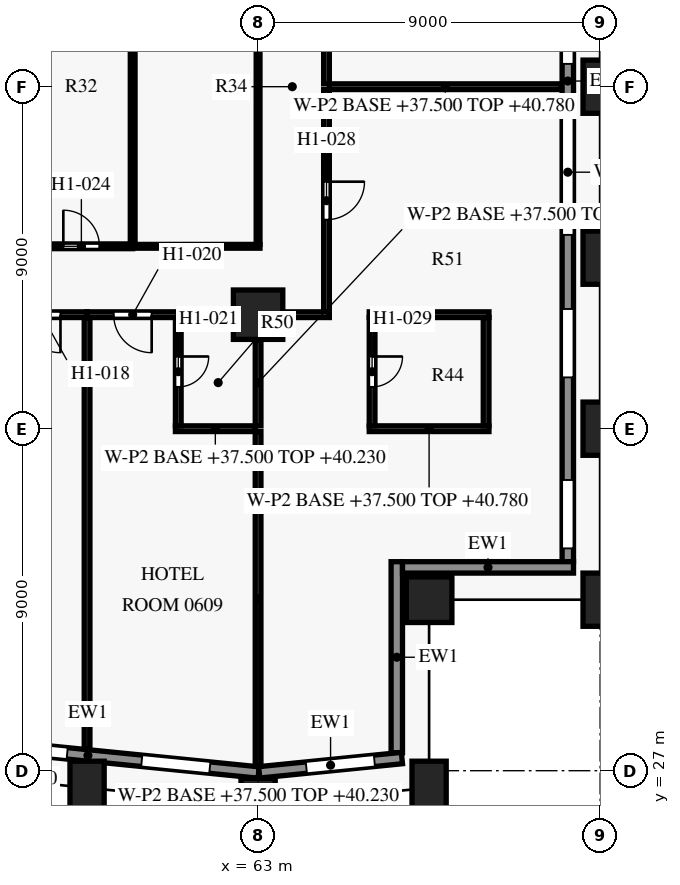
"""IFC4 building model, lengths in metres.
Left out: names, types, materials, properties, quantities, classifications, styles, units other than length and angle.
Written with IfcOpenShell. Run it as: python <this file> out.ifc"""

import sys

from ifc_helpers import new_model, si_unit, direction, frame, frame_2d, origin, origin_2d, place, context, subcontext, project, spatial, rectangle, extrude, element, fill, save


model = new_model("IFC4")
c1 = context("Model", 3, precision=1e-05, world=origin(), true_north=direction((0.0, 1.0)))
c2 = subcontext(c1, "Body", "Model", "MODEL_VIEW")
j1 = project(units=[si_unit("LENGTHUNIT", "METRE"), si_unit("PLANEANGLEUNIT", "RADIAN")], contexts=[c1])
p1 = place(None, origin())
s1 = spatial("IfcSite", under=j1, at=p1, CompositionType="ELEMENT")
p2 = place(p1, origin())
s2 = spatial("IfcBuilding", under=s1, at=p2, CompositionType="ELEMENT")
p3 = place(p2, frame((0.0, 0.0, 37.5)))
s3 = spatial("IfcBuildingStorey", under=s2, at=p3, CompositionType="ELEMENT", Elevation=37.5)
for number, where, z_axis, x_axis in (
    (1, (58.5, 26.55, 0.0), (0.0, 0.0, 1.0), (0.995, -0.1, 0.0)),
    (2, (63.0, 26.1, 0.0), (0.0, 0.0, 1.0), (1.0, 0.0, 0.0)),
    (3, (67.5, 26.55, 0.0), (0.0, 0.0, 1.0), (0.995, 0.1, 0.0)),
    (4, (72.0, 31.5, 0.0), (0.0, 0.0, 1.0), (0.0, 1.0, 0.0)),
    (5, (72.0, 36.0, 0.0), (0.0, 0.0, 1.0), (0.0, 1.0, 0.0)),
    (6, (72.0, 40.5, 0.0), (0.0, 0.0, 1.0), (0.0, 1.0, 0.0)),
    (7, (72.0, 45.0, 0.0), (0.0, 0.0, 1.0), (0.0, 1.0, 0.0)),
):
    element("IfcColumn", number, at=place(p3, frame(where, z_axis=z_axis, x_axis=x_axis)), inside=s3, PredefinedType="COLUMN", context=c2, shape_type="SweptSolid", body=[
        extrude(rectangle(XDim=0.9, YDim=1.4, at=origin_2d()), origin(), (0.0, 0.0, 1.0), 3.6),
    ])
p4 = place(p3, frame((67.5, 31.5, 0.0), z_axis=(0.0, 0.0, 1.0), x_axis=(1.0, 0.0, 0.0)))
e8 = element("IfcColumn", 8, at=p4, inside=s3, PredefinedType="COLUMN", context=c2, shape_type="SweptSolid", body=[
    extrude(rectangle(XDim=1.2, YDim=1.2, at=origin_2d()), origin(), (0.0, 0.0, 1.0), 3.6),
])
p5 = place(p3, frame((63.0, 39.0, 0.0), z_axis=(0.0, 0.0, 1.0), x_axis=(1.0, 0.0, 0.0)))
e9 = element("IfcColumn", 9, at=p5, inside=s3, PredefinedType="COLUMN", context=c2, shape_type="SweptSolid", body=[
    extrude(rectangle(XDim=1.3, YDim=1.3, at=origin_2d()), origin(), (0.0, 0.0, 1.0), 3.6),
])
p6 = place(p3, frame((63.015, 26.953, 0.0), z_axis=(0.0, 0.0, 1.0), x_axis=(-0.995035316196, 0.099522457379, 0.0)))
e10 = element("IfcWall", 10, at=p6, inside=s3, PredefinedType="SOLIDWALL", context=c2, shape_type="SweptSolid", body=[
    extrude(rectangle(XDim=9.03, YDim=0.3, at=frame_2d((4.515, 0.0))), origin(), (0.0, 0.0, 1.0), 2.95),
])
p7 = place(p6, frame((1.291, 0.0, 0.75)))
e11 = element("IfcOpeningElement", 11, at=p7, cuts=e10, PredefinedType="OPENING", context=c2, shape_type="SweptSolid", body=[
    extrude(rectangle(XDim=1.8, YDim=1.8, at=frame_2d((0.9, 0.9))), frame((0.0, 0.16, 0.0), z_axis=(0.0, -1.0, 0.0), x_axis=(1.0, 0.0, 0.0)), (0.0, 0.0, 1.0), 0.32),
])
p8 = place(p6, frame((5.064, 0.0, 0.15)))
e12 = element("IfcOpeningElement", 12, at=p8, cuts=e10, PredefinedType="OPENING", context=c2, shape_type="SweptSolid", body=[
    extrude(rectangle(XDim=3.3, YDim=2.4, at=frame_2d((1.65, 1.2))), frame((0.0, 0.16, 0.0), z_axis=(0.0, -1.0, 0.0), x_axis=(1.0, 0.0, 0.0)), (0.0, 0.0, 1.0), 0.32),
])
p9 = place(p3, frame((66.785, 27.333, 0.0), z_axis=(0.0, 0.0, 1.0), x_axis=(-0.995038471088, -0.099490909409, 0.0)))
e13 = element("IfcWall", 13, at=p9, inside=s3, PredefinedType="SOLIDWALL", context=c2, shape_type="SweptSolid", body=[
    extrude(rectangle(XDim=3.774, YDim=0.3, at=frame_2d((1.887, 0.0))), origin(), (0.0, 0.0, 1.0), 2.95),
])
p10 = place(p9, frame((0.728, 0.0, 0.75)))
e14 = element("IfcOpeningElement", 14, at=p10, cuts=e13, PredefinedType="OPENING", context=c2, shape_type="SweptSolid", body=[
    extrude(rectangle(XDim=1.8, YDim=1.8, at=frame_2d((0.9, 0.9))), frame((0.0, 0.16, 0.0), z_axis=(0.0, -1.0, 0.0), x_axis=(1.0, 0.0, 0.0)), (0.0, 0.0, 1.0), 0.32),
])
p11 = place(p3, frame((66.65, 32.5, 0.0), z_axis=(0.0, 0.0, 1.0), x_axis=(0.0, -1.0, 0.0)))
e15 = element("IfcWall", 15, at=p11, inside=s3, PredefinedType="SOLIDWALL", context=c2, shape_type="SweptSolid", body=[
    extrude(rectangle(XDim=5.029, YDim=0.3, at=frame_2d((2.514, 0.0))), origin(), (0.0, 0.0, 1.0), 2.95),
])
p12 = place(p3, frame((71.3, 32.35, 0.0), z_axis=(0.0, 0.0, 1.0), x_axis=(-1.0, 0.0, 0.0)))
e16 = element("IfcWall", 16, at=p12, inside=s3, PredefinedType="SOLIDWALL", context=c2, shape_type="SweptSolid", body=[
    extrude(rectangle(XDim=4.5, YDim=0.3, at=frame_2d((2.25, 0.0))), origin(), (0.0, 0.0, 1.0), 2.95),
])
p13 = place(p3, frame((71.15, 57.8, 0.0), z_axis=(0.0, 0.0, 1.0), x_axis=(0.0, -1.0, 0.0)))
e17 = element("IfcWall", 17, at=p13, inside=s3, PredefinedType="SOLIDWALL", context=c2, shape_type="SweptSolid", body=[
    extrude(rectangle(XDim=25.302, YDim=0.3, at=frame_2d((12.651, 0.0))), origin(), (0.0, 0.0, 1.0), 2.95),
])
p14 = place(p13, frame((0.65, 0.0, 0.75)))
e18 = element("IfcOpeningElement", 18, at=p14, cuts=e17, PredefinedType="OPENING", context=c2, shape_type="SweptSolid", body=[
    extrude(rectangle(XDim=1.8, YDim=1.8, at=frame_2d((0.9, 0.9))), frame((0.0, 0.16, 0.0), z_axis=(0.0, -1.0, 0.0), x_axis=(1.0, 0.0, 0.0)), (0.0, 0.0, 1.0), 0.32),
])
p15 = place(p13, frame((5.15, 0.0, 0.75)))
e19 = element("IfcOpeningElement", 19, at=p15, cuts=e17, PredefinedType="OPENING", context=c2, shape_type="SweptSolid", body=[
    extrude(rectangle(XDim=1.8, YDim=1.8, at=frame_2d((0.9, 0.9))), frame((0.0, 0.16, 0.0), z_axis=(0.0, -1.0, 0.0), x_axis=(1.0, 0.0, 0.0)), (0.0, 0.0, 1.0), 0.32),
])
p16 = place(p13, frame((8.9, 0.0, 0.15)))
e20 = element("IfcOpeningElement", 20, at=p16, cuts=e17, PredefinedType="OPENING", context=c2, shape_type="SweptSolid", body=[
    extrude(rectangle(XDim=3.3, YDim=2.4, at=frame_2d((1.65, 1.2))), frame((0.0, 0.16, 0.0), z_axis=(0.0, -1.0, 0.0), x_axis=(1.0, 0.0, 0.0)), (0.0, 0.0, 1.0), 0.32),
])
p17 = place(p13, frame((13.4, 0.0, 0.15)))
e21 = element("IfcOpeningElement", 21, at=p17, cuts=e17, PredefinedType="OPENING", context=c2, shape_type="SweptSolid", body=[
    extrude(rectangle(XDim=3.3, YDim=2.4, at=frame_2d((1.65, 1.2))), frame((0.0, 0.16, 0.0), z_axis=(0.0, -1.0, 0.0), x_axis=(1.0, 0.0, 0.0)), (0.0, 0.0, 1.0), 0.32),
])
p18 = place(p13, frame((18.65, 0.0, 0.75)))
e22 = element("IfcOpeningElement", 22, at=p18, cuts=e17, PredefinedType="OPENING", context=c2, shape_type="SweptSolid", body=[
    extrude(rectangle(XDim=1.8, YDim=1.8, at=frame_2d((0.9, 0.9))), frame((0.0, 0.16, 0.0), z_axis=(0.0, -1.0, 0.0), x_axis=(1.0, 0.0, 0.0)), (0.0, 0.0, 1.0), 0.32),
])
p19 = place(p13, frame((23.15, 0.0, 0.75)))
e23 = element("IfcOpeningElement", 23, at=p19, cuts=e17, PredefinedType="OPENING", context=c2, shape_type="SweptSolid", body=[
    extrude(rectangle(XDim=1.8, YDim=1.8, at=frame_2d((0.9, 0.9))), frame((0.0, 0.16, 0.0), z_axis=(0.0, -1.0, 0.0), x_axis=(1.0, 0.0, 0.0)), (0.0, 0.0, 1.0), 0.32),
])
p20 = place(p3, frame((63.0, 35.925, 0.0), z_axis=(0.0, 0.0, 1.0), x_axis=(0.0, -1.0, 0.0)))
e24 = element("IfcWall", 24, at=p20, inside=s3, PredefinedType="PARTITIONING", context=c2, shape_type="SweptSolid", body=[
    extrude(rectangle(XDim=8.8, YDim=0.15, at=frame_2d((4.4, 0.0))), origin(), (0.0, 0.0, 1.0), 2.73),
])
p21 = place(p3, frame((60.825, 36.0, 0.0), z_axis=(0.0, 0.0, 1.0), x_axis=(1.0, 0.0, 0.0)))
e25 = element("IfcWall", 25, at=p21, inside=s3, PredefinedType="PARTITIONING", context=c2, shape_type="SweptSolid", body=[
    extrude(rectangle(XDim=2.1, YDim=0.15, at=frame_2d((1.05, 0.0))), origin(), (0.0, 0.0, 1.0), 2.73),
])
p22 = place(p3, frame((65.925, 36.0, 0.0), z_axis=(0.0, 0.0, 1.0), x_axis=(1.0, 0.0, 0.0)))
e26 = element("IfcWall", 26, at=p22, inside=s3, PredefinedType="PARTITIONING", context=c2, shape_type="SweptSolid", body=[
    extrude(rectangle(XDim=3.15, YDim=0.15, at=frame_2d((1.575, 0.0))), origin(), (0.0, 0.0, 1.0), 3.28),
])
p23 = place(p3, frame((69.0, 36.075, 0.0), z_axis=(0.0, 0.0, 1.0), x_axis=(0.0, 1.0, 0.0)))
e27 = element("IfcWall", 27, at=p23, inside=s3, PredefinedType="PARTITIONING", context=c2, shape_type="SweptSolid", body=[
    extrude(rectangle(XDim=2.85, YDim=0.15, at=frame_2d((1.425, 0.0))), origin(), (0.0, 0.0, 1.0), 2.58),
])
p24 = place(p3, frame((63.0, 38.345, 0.0), z_axis=(0.0, 0.0, 1.0), x_axis=(0.0, -1.0, 0.0)))
e28 = element("IfcWall", 28, at=p24, inside=s3, PredefinedType="PARTITIONING", context=c2, shape_type="SweptSolid", body=[
    extrude(rectangle(XDim=2.27, YDim=0.15, at=frame_2d((1.135, 0.0))), origin(), (0.0, 0.0, 1.0), 2.73),
])
p25 = place(p3, frame((58.5, 38.925, 0.0), z_axis=(0.0, 0.0, 1.0), x_axis=(0.0, -1.0, 0.0)))
e29 = element("IfcWall", 29, at=p25, inside=s3, PredefinedType="PARTITIONING", context=c2, shape_type="SweptSolid", body=[
    extrude(rectangle(XDim=11.35, YDim=0.15, at=frame_2d((5.675, 0.0))), origin(), (0.0, 0.0, 1.0), 2.58),
])
p26 = place(p3, frame((60.9, 38.925, 0.0), z_axis=(0.0, 0.0, 1.0), x_axis=(0.0, -1.0, 0.0)))
e30 = element("IfcWall", 30, at=p26, inside=s3, PredefinedType="PARTITIONING", context=c2, shape_type="SweptSolid", body=[
    extrude(rectangle(XDim=2.85, YDim=0.15, at=frame_2d((1.425, 0.0))), origin(), (0.0, 0.0, 1.0), 2.58),
])
p27 = place(p26, frame((1.025, 0.0, 0.0)))
e31 = element("IfcOpeningElement", 31, at=p27, cuts=e30, PredefinedType="OPENING", context=c2, shape_type="SweptSolid", body=[
    extrude(rectangle(XDim=0.8, YDim=2.1, at=frame_2d((0.4, 1.05))), frame((0.0, 0.085, 0.0), z_axis=(0.0, -1.0, 0.0), x_axis=(1.0, 0.0, 0.0)), (0.0, 0.0, 1.0), 0.17),
])
p28 = place(p3, frame((66.0, 38.925, 0.0), z_axis=(0.0, 0.0, 1.0), x_axis=(0.0, -1.0, 0.0)))
e32 = element("IfcWall", 32, at=p28, inside=s3, PredefinedType="PARTITIONING", context=c2, shape_type="SweptSolid", body=[
    extrude(rectangle(XDim=2.85, YDim=0.15, at=frame_2d((1.425, 0.0))), origin(), (0.0, 0.0, 1.0), 2.58),
])
p29 = place(p28, frame((1.025, 0.0, 0.0)))
e33 = element("IfcOpeningElement", 33, at=p29, cuts=e32, PredefinedType="OPENING", context=c2, shape_type="SweptSolid", body=[
    extrude(rectangle(XDim=0.8, YDim=2.1, at=frame_2d((0.4, 1.05))), frame((0.0, 0.085, 0.0), z_axis=(0.0, -1.0, 0.0), x_axis=(1.0, 0.0, 0.0)), (0.0, 0.0, 1.0), 0.17),
])
p30 = place(p3, frame((58.5, 39.0, 0.0), z_axis=(0.0, 0.0, 1.0), x_axis=(-1.0, 0.0, 0.0)))
e34 = element("IfcWall", 34, at=p30, inside=s3, PredefinedType="PARTITIONING", context=c2, shape_type="SweptSolid", body=[
    extrude(rectangle(XDim=2.4, YDim=0.15, at=frame_2d((1.2, 0.0))), origin(), (0.0, 0.0, 1.0), 2.58),
])
p31 = place(p30, frame((0.7, 0.0, 0.0)))
e35 = element("IfcOpeningElement", 35, at=p31, cuts=e34, PredefinedType="OPENING", context=c2, shape_type="SweptSolid", body=[
    extrude(rectangle(XDim=1.0, YDim=2.1, at=frame_2d((0.5, 1.05))), frame((0.0, 0.085, 0.0), z_axis=(0.0, -1.0, 0.0), x_axis=(1.0, 0.0, 0.0)), (0.0, 0.0, 1.0), 0.17),
])
p32 = place(p3, frame((60.9, 39.0, 0.0), z_axis=(0.0, 0.0, 1.0), x_axis=(-1.0, 0.0, 0.0)))
e36 = element("IfcWall", 36, at=p32, inside=s3, PredefinedType="PARTITIONING", context=c2, shape_type="SweptSolid", body=[
    extrude(rectangle(XDim=2.4, YDim=0.15, at=frame_2d((1.2, 0.0))), origin(), (0.0, 0.0, 1.0), 2.58),
])
p33 = place(p32, frame((0.7, 0.0, 0.0)))
e37 = element("IfcOpeningElement", 37, at=p33, cuts=e36, PredefinedType="OPENING", context=c2, shape_type="SweptSolid", body=[
    extrude(rectangle(XDim=1.0, YDim=2.1, at=frame_2d((0.5, 1.05))), frame((0.0, 0.085, 0.0), z_axis=(0.0, -1.0, 0.0), x_axis=(1.0, 0.0, 0.0)), (0.0, 0.0, 1.0), 0.17),
])
p34 = place(p3, frame((62.345, 39.0, 0.0), z_axis=(0.0, 0.0, 1.0), x_axis=(-1.0, 0.0, 0.0)))
e38 = element("IfcWall", 38, at=p34, inside=s3, PredefinedType="PARTITIONING", context=c2, shape_type="SweptSolid", body=[
    extrude(rectangle(XDim=1.445, YDim=0.15, at=frame_2d((0.723, 0.0))), origin(), (0.0, 0.0, 1.0), 2.58),
])
p35 = place(p3, frame((64.875, 39.0, 0.0), z_axis=(0.0, 0.0, 1.0), x_axis=(-1.0, 0.0, 0.0)))
e39 = element("IfcWall", 39, at=p35, inside=s3, PredefinedType="PARTITIONING", context=c2, shape_type="SweptSolid", body=[
    extrude(rectangle(XDim=1.22, YDim=0.15, at=frame_2d((0.61, 0.0))), origin(), (0.0, 0.0, 1.0), 2.58),
])
p36 = place(p3, frame((69.075, 39.0, 0.0), z_axis=(0.0, 0.0, 1.0), x_axis=(-1.0, 0.0, 0.0)))
e40 = element("IfcWall", 40, at=p36, inside=s3, PredefinedType="PARTITIONING", context=c2, shape_type="SweptSolid", body=[
    extrude(rectangle(XDim=3.15, YDim=0.15, at=frame_2d((1.575, 0.0))), origin(), (0.0, 0.0, 1.0), 2.58),
])
p37 = place(p3, frame((57.0, 40.8, 0.0), z_axis=(0.0, 0.0, 1.0), x_axis=(1.0, 0.0, 0.0)))
e41 = element("IfcWall", 41, at=p37, inside=s3, PredefinedType="PARTITIONING", context=c2, shape_type="SweptSolid", body=[
    extrude(rectangle(XDim=2.7, YDim=0.125, at=frame_2d((1.35, 0.0))), origin(), (0.0, 0.0, 1.0), 3.28),
])
p38 = place(p37, frame((0.875, 0.0, 0.0)))
e42 = element("IfcOpeningElement", 42, at=p38, cuts=e41, PredefinedType="OPENING", context=c2, shape_type="SweptSolid", body=[
    extrude(rectangle(XDim=0.95, YDim=2.1, at=frame_2d((0.475, 1.05))), frame((0.0, 0.073, 0.0), z_axis=(0.0, -1.0, 0.0), x_axis=(1.0, 0.0, 0.0)), (0.0, 0.0, 1.0), 0.145),
])
p39 = place(p3, frame((59.7, 40.8, 0.0), z_axis=(0.0, 0.0, 1.0), x_axis=(1.0, 0.0, 0.0)))
e43 = element("IfcWall", 43, at=p39, inside=s3, PredefinedType="PARTITIONING", context=c2, shape_type="SweptSolid", body=[
    extrude(rectangle(XDim=3.35, YDim=0.1, at=frame_2d((1.675, 0.0))), origin(), (0.0, 0.0, 1.0), 2.73),
])
p40 = place(p3, frame((63.0, 40.85, 0.0), z_axis=(0.0, 0.0, 1.0), x_axis=(0.0, 1.0, 0.0)))
e44 = element("IfcWall", 44, at=p40, inside=s3, PredefinedType="PARTITIONING", context=c2, shape_type="SweptSolid", body=[
    extrude(rectangle(XDim=8.3, YDim=0.1, at=frame_2d((4.15, 0.0))), origin(), (0.0, 0.0, 1.0), 2.73),
])
p41 = place(p3, frame((64.8, 44.925, 0.0), z_axis=(0.0, 0.0, 1.0), x_axis=(0.0, -1.0, 0.0)))
e45 = element("IfcWall", 45, at=p41, inside=s3, PredefinedType="PARTITIONING", context=c2, shape_type="SweptSolid", body=[
    extrude(rectangle(XDim=5.85, YDim=0.15, at=frame_2d((2.925, 0.0))), origin(), (0.0, 0.0, 1.0), 2.58),
])
p42 = place(p41, frame((2.425, 0.0, 0.0)))
e46 = element("IfcOpeningElement", 46, at=p42, cuts=e45, PredefinedType="OPENING", context=c2, shape_type="SweptSolid", body=[
    extrude(rectangle(XDim=1.0, YDim=2.1, at=frame_2d((0.5, 1.05))), frame((0.0, 0.085, 0.0), z_axis=(0.0, -1.0, 0.0), x_axis=(1.0, 0.0, 0.0)), (0.0, 0.0, 1.0), 0.17),
])
p43 = place(p3, frame((70.98, 45.0, 0.0), z_axis=(0.0, 0.0, 1.0), x_axis=(-1.0, 0.0, 0.0)))
e47 = element("IfcWall", 47, at=p43, inside=s3, PredefinedType="PARTITIONING", context=c2, shape_type="SweptSolid", body=[
    extrude(rectangle(XDim=6.105, YDim=0.15, at=frame_2d((3.052, 0.0))), origin(), (0.0, 0.0, 1.0), 3.28),
])
p44 = place(p3, frame((59.7, 49.137, 0.0), z_axis=(0.0, 0.0, 1.0), x_axis=(0.0, -1.0, 0.0)))
e48 = element("IfcWall", 48, at=p44, inside=s3, PredefinedType="PARTITIONING", context=c2, shape_type="SweptSolid", body=[
    extrude(rectangle(XDim=8.275, YDim=0.125, at=frame_2d((4.137, 0.0))), origin(), (0.0, 0.0, 1.0), 3.28),
])
p45 = place(p3, frame((64.8, 50.925, 0.0), z_axis=(0.0, 0.0, 1.0), x_axis=(0.0, -1.0, 0.0)))
e49 = element("IfcWall", 49, at=p45, inside=s3, PredefinedType="PARTITIONING", context=c2, shape_type="SweptSolid", body=[
    extrude(rectangle(XDim=5.85, YDim=0.15, at=frame_2d((2.925, 0.0))), origin(), (0.0, 0.0, 1.0), 2.58),
])
p46 = place(p45, frame((2.425, 0.0, 0.0)))
e50 = element("IfcOpeningElement", 50, at=p46, cuts=e49, PredefinedType="OPENING", context=c2, shape_type="SweptSolid", body=[
    extrude(rectangle(XDim=1.0, YDim=2.1, at=frame_2d((0.5, 1.05))), frame((0.0, 0.085, 0.0), z_axis=(0.0, -1.0, 0.0), x_axis=(1.0, 0.0, 0.0)), (0.0, 0.0, 1.0), 0.17),
])
p47 = place(p7, origin())
e51 = element("IfcWindow", 51, at=p47, inside=s3, PartitioningType="SINGLE_PANEL", PredefinedType="WINDOW", context=c2, shape_type="SweptSolid", body=[
    extrude(rectangle(XDim=1.8, YDim=1.8, at=frame_2d((0.9, 0.9))), frame((0.0, 0.03, 0.0), z_axis=(0.0, -1.0, 0.0), x_axis=(1.0, 0.0, 0.0)), (0.0, 0.0, 1.0), 0.06),
])
fill(e11, e51)
p48 = place(p8, origin())
e52 = element("IfcWindow", 52, at=p48, inside=s3, PartitioningType="SINGLE_PANEL", PredefinedType="WINDOW", context=c2, shape_type="SweptSolid", body=[
    extrude(rectangle(XDim=3.3, YDim=2.4, at=frame_2d((1.65, 1.2))), frame((0.0, 0.03, 0.0), z_axis=(0.0, -1.0, 0.0), x_axis=(1.0, 0.0, 0.0)), (0.0, 0.0, 1.0), 0.06),
])
fill(e12, e52)
p49 = place(p10, origin())
e53 = element("IfcWindow", 53, at=p49, inside=s3, PartitioningType="SINGLE_PANEL", PredefinedType="WINDOW", context=c2, shape_type="SweptSolid", body=[
    extrude(rectangle(XDim=1.8, YDim=1.8, at=frame_2d((0.9, 0.9))), frame((0.0, 0.03, 0.0), z_axis=(0.0, -1.0, 0.0), x_axis=(1.0, 0.0, 0.0)), (0.0, 0.0, 1.0), 0.06),
])
fill(e14, e53)
p50 = place(p16, origin())
e54 = element("IfcWindow", 54, at=p50, inside=s3, PartitioningType="SINGLE_PANEL", PredefinedType="WINDOW", context=c2, shape_type="SweptSolid", body=[
    extrude(rectangle(XDim=3.3, YDim=2.4, at=frame_2d((1.65, 1.2))), frame((0.0, 0.03, 0.0), z_axis=(0.0, -1.0, 0.0), x_axis=(1.0, 0.0, 0.0)), (0.0, 0.0, 1.0), 0.06),
])
fill(e20, e54)
p51 = place(p17, origin())
e55 = element("IfcWindow", 55, at=p51, inside=s3, PartitioningType="SINGLE_PANEL", PredefinedType="WINDOW", context=c2, shape_type="SweptSolid", body=[
    extrude(rectangle(XDim=3.3, YDim=2.4, at=frame_2d((1.65, 1.2))), frame((0.0, 0.03, 0.0), z_axis=(0.0, -1.0, 0.0), x_axis=(1.0, 0.0, 0.0)), (0.0, 0.0, 1.0), 0.06),
])
fill(e21, e55)
p52 = place(p18, origin())
e56 = element("IfcWindow", 56, at=p52, inside=s3, PartitioningType="SINGLE_PANEL", PredefinedType="WINDOW", context=c2, shape_type="SweptSolid", body=[
    extrude(rectangle(XDim=1.8, YDim=1.8, at=frame_2d((0.9, 0.9))), frame((0.0, 0.03, 0.0), z_axis=(0.0, -1.0, 0.0), x_axis=(1.0, 0.0, 0.0)), (0.0, 0.0, 1.0), 0.06),
])
fill(e22, e56)
p53 = place(p19, origin())
e57 = element("IfcWindow", 57, at=p53, inside=s3, PartitioningType="SINGLE_PANEL", PredefinedType="WINDOW", context=c2, shape_type="SweptSolid", body=[
    extrude(rectangle(XDim=1.8, YDim=1.8, at=frame_2d((0.9, 0.9))), frame((0.0, 0.03, 0.0), z_axis=(0.0, -1.0, 0.0), x_axis=(1.0, 0.0, 0.0)), (0.0, 0.0, 1.0), 0.06),
])
fill(e23, e57)
p54 = place(p31, origin())
e58 = element("IfcDoor", 58, at=p54, inside=s3, OperationType="SINGLE_SWING_LEFT", PredefinedType="DOOR", context=c2, shape_type="SweptSolid", body=[
    extrude(rectangle(XDim=1.0, YDim=2.1, at=frame_2d((0.5, 1.05))), frame((0.0, 0.025, 0.0), z_axis=(0.0, -1.0, 0.0), x_axis=(1.0, 0.0, 0.0)), (0.0, 0.0, 1.0), 0.05),
])
fill(e35, e58)
p55 = place(p33, origin())
e59 = element("IfcDoor", 59, at=p55, inside=s3, OperationType="SINGLE_SWING_LEFT", PredefinedType="DOOR", context=c2, shape_type="SweptSolid", body=[
    extrude(rectangle(XDim=1.0, YDim=2.1, at=frame_2d((0.5, 1.05))), frame((0.0, 0.025, 0.0), z_axis=(0.0, -1.0, 0.0), x_axis=(1.0, 0.0, 0.0)), (0.0, 0.0, 1.0), 0.05),
])
fill(e37, e59)
p56 = place(p27, origin())
e60 = element("IfcDoor", 60, at=p56, inside=s3, OperationType="SINGLE_SWING_LEFT", PredefinedType="DOOR", context=c2, shape_type="SweptSolid", body=[
    extrude(rectangle(XDim=0.8, YDim=2.1, at=frame_2d((0.4, 1.05))), frame((0.0, 0.025, 0.0), z_axis=(0.0, -1.0, 0.0), x_axis=(1.0, 0.0, 0.0)), (0.0, 0.0, 1.0), 0.05),
])
fill(e31, e60)
p57 = place(p38, origin())
e61 = element("IfcDoor", 61, at=p57, inside=s3, OperationType="SINGLE_SWING_LEFT", PredefinedType="DOOR", context=c2, shape_type="SweptSolid", body=[
    extrude(rectangle(XDim=0.95, YDim=2.1, at=frame_2d((0.475, 1.05))), frame((0.0, 0.025, 0.0), z_axis=(0.0, -1.0, 0.0), x_axis=(1.0, 0.0, 0.0)), (0.0, 0.0, 1.0), 0.05),
])
fill(e42, e61)
p58 = place(p42, origin())
e62 = element("IfcDoor", 62, at=p58, inside=s3, OperationType="SINGLE_SWING_LEFT", PredefinedType="DOOR", context=c2, shape_type="SweptSolid", body=[
    extrude(rectangle(XDim=1.0, YDim=2.1, at=frame_2d((0.5, 1.05))), frame((0.0, 0.025, 0.0), z_axis=(0.0, -1.0, 0.0), x_axis=(1.0, 0.0, 0.0)), (0.0, 0.0, 1.0), 0.05),
])
fill(e46, e62)
p59 = place(p29, origin())
e63 = element("IfcDoor", 63, at=p59, inside=s3, OperationType="SINGLE_SWING_RIGHT", PredefinedType="DOOR", context=c2, shape_type="SweptSolid", body=[
    extrude(rectangle(XDim=0.8, YDim=2.1, at=frame_2d((0.4, 1.05))), frame((0.0, 0.025, 0.0), z_axis=(0.0, -1.0, 0.0), x_axis=(1.0, 0.0, 0.0)), (0.0, 0.0, 1.0), 0.05),
])
fill(e33, e63)
save(model, sys.argv[1])
